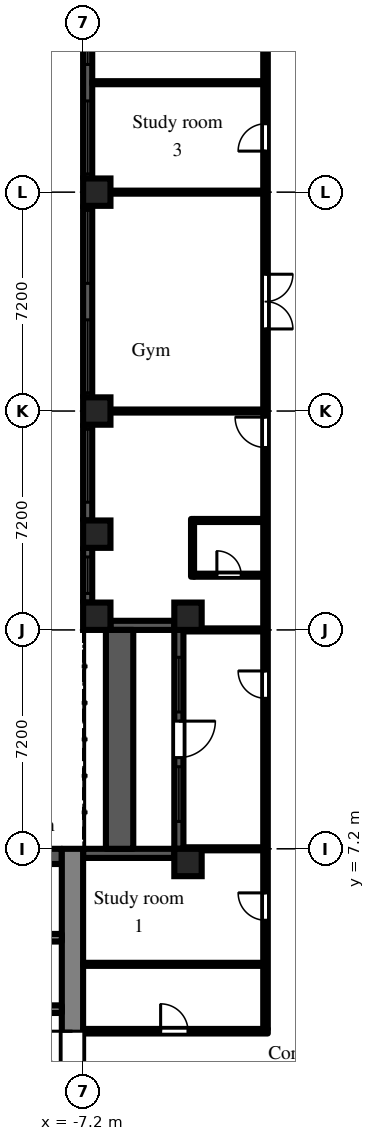
"""IFC4 building model, lengths in metres.
Left out: names, types, materials, properties, quantities, classifications, styles, units other than length and angle.
Written with IfcOpenShell. Run it as: python <this file> out.ifc"""

import sys

from ifc_helpers import new_model, si_unit, direction, frame, frame_2d, origin, origin_2d, place, context, subcontext, project, spatial, rectangle, extrude, element, fill, save


model = new_model("IFC4")
c1 = context("Model", 3, precision=1e-05, world=origin(), true_north=direction((0.0, 1.0)))
c2 = subcontext(c1, "Body", "Model", "MODEL_VIEW")
j1 = project(units=[si_unit("LENGTHUNIT", "METRE"), si_unit("PLANEANGLEUNIT", "RADIAN")], contexts=[c1])
p1 = place(None, origin())
s1 = spatial("IfcSite", under=j1, at=p1, CompositionType="ELEMENT")
p2 = place(p1, origin())
s2 = spatial("IfcBuilding", under=s1, at=p2, CompositionType="ELEMENT")
p3 = place(p2, frame((0.0, 0.0, 35.7)))
s3 = spatial("IfcBuildingStorey", under=s2, at=p3, CompositionType="ELEMENT", Elevation=35.7)
for number, where, z_axis, x_axis in (
    (1, (-6.75, 14.85, 0.0), (0.0, 0.0, 1.0), (1.0, 0.0, 0.0)),
    (2, (-6.75, 17.55, 0.0), (0.0, 0.0, 1.0), (1.0, 0.0, 0.0)),
    (3, (-6.75, 21.6, 0.0), (0.0, 0.0, 1.0), (1.0, 0.0, 0.0)),
    (4, (-6.75, 28.8, 0.0), (0.0, 0.0, 1.0), (1.0, 0.0, 0.0)),
    (5, (-3.75, 6.75, 0.0), (0.0, 0.0, 1.0), (1.0, 0.0, 0.0)),
    (6, (-3.75, 14.85, 0.0), (0.0, 0.0, 1.0), (1.0, 0.0, 0.0)),
):
    element("IfcColumn", number, at=place(p3, frame(where, z_axis=z_axis, x_axis=x_axis)), inside=s3, PredefinedType="COLUMN", context=c2, shape_type="SweptSolid", body=[
        extrude(rectangle(XDim=0.9, YDim=0.9, at=origin_2d()), origin(), (0.0, 0.0, 1.0), 3.0),
    ])
p4 = place(p3, frame((-7.05, 35.55, 0.0), z_axis=(0.0, 0.0, 1.0), x_axis=(0.0, -1.0, 0.0)))
e7 = element("IfcWall", 7, at=p4, inside=s3, PredefinedType="SOLIDWALL", context=c2, shape_type="SweptSolid", body=[
    extrude(rectangle(XDim=6.3, YDim=0.3, at=frame_2d((3.15, 0.0))), origin(), (0.0, 0.0, 1.0), 2.1),
])
p5 = place(p4, frame((0.15, 0.0, 0.2)))
e8 = element("IfcOpeningElement", 8, at=p5, cuts=e7, PredefinedType="OPENING", context=c2, shape_type="SweptSolid", body=[
    extrude(rectangle(XDim=2.4, YDim=1.85, at=frame_2d((1.2, 0.925))), frame((0.0, 0.16, 0.0), z_axis=(0.0, -1.0, 0.0), x_axis=(1.0, 0.0, 0.0)), (0.0, 0.0, 1.0), 0.32),
])
p6 = place(p4, frame((3.75, 0.0, 0.2)))
e9 = element("IfcOpeningElement", 9, at=p6, cuts=e7, PredefinedType="OPENING", context=c2, shape_type="SweptSolid", body=[
    extrude(rectangle(XDim=2.4, YDim=1.85, at=frame_2d((1.2, 0.925))), frame((0.0, 0.16, 0.0), z_axis=(0.0, -1.0, 0.0), x_axis=(1.0, 0.0, 0.0)), (0.0, 0.0, 1.0), 0.32),
])
p7 = place(p3, frame((-7.05, 28.35, 0.0), z_axis=(0.0, 0.0, 1.0), x_axis=(0.0, -1.0, 0.0)))
e10 = element("IfcWall", 10, at=p7, inside=s3, PredefinedType="SOLIDWALL", context=c2, shape_type="SweptSolid", body=[
    extrude(rectangle(XDim=6.3, YDim=0.3, at=frame_2d((3.15, 0.0))), origin(), (0.0, 0.0, 1.0), 2.1),
])
p8 = place(p7, frame((0.15, 0.0, 0.2)))
e11 = element("IfcOpeningElement", 11, at=p8, cuts=e10, PredefinedType="OPENING", context=c2, shape_type="SweptSolid", body=[
    extrude(rectangle(XDim=2.4, YDim=1.85, at=frame_2d((1.2, 0.925))), frame((0.0, 0.16, 0.0), z_axis=(0.0, -1.0, 0.0), x_axis=(1.0, 0.0, 0.0)), (0.0, 0.0, 1.0), 0.32),
])
p9 = place(p7, frame((3.75, 0.0, 0.2)))
e12 = element("IfcOpeningElement", 12, at=p9, cuts=e10, PredefinedType="OPENING", context=c2, shape_type="SweptSolid", body=[
    extrude(rectangle(XDim=2.4, YDim=1.85, at=frame_2d((1.2, 0.925))), frame((0.0, 0.16, 0.0), z_axis=(0.0, -1.0, 0.0), x_axis=(1.0, 0.0, 0.0)), (0.0, 0.0, 1.0), 0.32),
])
p10 = place(p3, frame((-7.05, 21.15, 0.0), z_axis=(0.0, 0.0, 1.0), x_axis=(0.0, -1.0, 0.0)))
e13 = element("IfcWall", 13, at=p10, inside=s3, PredefinedType="SOLIDWALL", context=c2, shape_type="SweptSolid", body=[
    extrude(rectangle(XDim=3.15, YDim=0.3, at=frame_2d((1.575, 0.0))), origin(), (0.0, 0.0, 1.0), 2.1),
])
p11 = place(p10, frame((0.15, 0.0, 0.2)))
e14 = element("IfcOpeningElement", 14, at=p11, cuts=e13, PredefinedType="OPENING", context=c2, shape_type="SweptSolid", body=[
    extrude(rectangle(XDim=2.4, YDim=1.85, at=frame_2d((1.2, 0.925))), frame((0.0, 0.16, 0.0), z_axis=(0.0, -1.0, 0.0), x_axis=(1.0, 0.0, 0.0)), (0.0, 0.0, 1.0), 0.32),
])
p12 = place(p3, frame((-7.05, 17.1, 0.0), z_axis=(0.0, 0.0, 1.0), x_axis=(0.0, -1.0, 0.0)))
e15 = element("IfcWall", 15, at=p12, inside=s3, PredefinedType="SOLIDWALL", context=c2, shape_type="SweptSolid", body=[
    extrude(rectangle(XDim=1.8, YDim=0.3, at=frame_2d((0.9, 0.0))), origin(), (0.0, 0.0, 1.0), 2.1),
])
p13 = place(p12, frame((0.3, 0.0, 0.2)))
e16 = element("IfcOpeningElement", 16, at=p13, cuts=e15, PredefinedType="OPENING", context=c2, shape_type="SweptSolid", body=[
    extrude(rectangle(XDim=1.2, YDim=1.85, at=frame_2d((0.6, 0.925))), frame((0.0, 0.16, 0.0), z_axis=(0.0, -1.0, 0.0), x_axis=(1.0, 0.0, 0.0)), (0.0, 0.0, 1.0), 0.32),
])
p14 = place(p3, frame((-6.3, 14.55, 0.0), z_axis=(0.0, 0.0, 1.0), x_axis=(1.0, 0.0, 0.0)))
e17 = element("IfcWall", 17, at=p14, inside=s3, PredefinedType="SOLIDWALL", context=c2, shape_type="SweptSolid", body=[
    extrude(rectangle(XDim=2.1, YDim=0.3, at=frame_2d((1.05, 0.0))), origin(), (0.0, 0.0, 1.0), 2.1),
])
p15 = place(p3, frame((-4.05, 14.4, 0.0), z_axis=(0.0, 0.0, 1.0), x_axis=(0.0, -1.0, 0.0)))
e18 = element("IfcWall", 18, at=p15, inside=s3, PredefinedType="SOLIDWALL", context=c2, shape_type="SweptSolid", body=[
    extrude(rectangle(XDim=7.2, YDim=0.3, at=frame_2d((3.6, 0.0))), origin(), (0.0, 0.0, 1.0), 2.1),
])
p16 = place(p15, frame((3.0, 0.0, 0.0)))
e19 = element("IfcOpeningElement", 19, at=p16, cuts=e18, PredefinedType="OPENING", context=c2, shape_type="SweptSolid", body=[
    extrude(rectangle(XDim=1.2, YDim=2.05, at=frame_2d((0.6, 1.025))), frame((0.0, 0.16, 0.0), z_axis=(0.0, -1.0, 0.0), x_axis=(1.0, 0.0, 0.0)), (0.0, 0.0, 1.0), 0.32),
])
p17 = place(p15, frame((0.9, 0.0, 0.2)))
e20 = element("IfcOpeningElement", 20, at=p17, cuts=e18, PredefinedType="OPENING", context=c2, shape_type="SweptSolid", body=[
    extrude(rectangle(XDim=1.8, YDim=1.85, at=frame_2d((0.9, 0.925))), frame((0.0, 0.16, 0.0), z_axis=(0.0, -1.0, 0.0), x_axis=(1.0, 0.0, 0.0)), (0.0, 0.0, 1.0), 0.32),
])
p18 = place(p15, frame((4.5, 0.0, 0.2)))
e21 = element("IfcOpeningElement", 21, at=p18, cuts=e18, PredefinedType="OPENING", context=c2, shape_type="SweptSolid", body=[
    extrude(rectangle(XDim=1.8, YDim=1.85, at=frame_2d((0.9, 0.925))), frame((0.0, 0.16, 0.0), z_axis=(0.0, -1.0, 0.0), x_axis=(1.0, 0.0, 0.0)), (0.0, 0.0, 1.0), 0.32),
])
p19 = place(p3, frame((-4.2, 7.05, 0.0), z_axis=(0.0, 0.0, 1.0), x_axis=(-1.0, 0.0, 0.0)))
e22 = element("IfcWall", 22, at=p19, inside=s3, PredefinedType="SOLIDWALL", context=c2, shape_type="SweptSolid", body=[
    extrude(rectangle(XDim=3.0, YDim=0.3, at=frame_2d((1.5, 0.0))), origin(), (0.0, 0.0, 1.0), 2.1),
])
p20 = place(p3, frame((-6.0, 7.2, 0.0), z_axis=(0.0, 0.0, 1.0), x_axis=(0.0, 1.0, 0.0)))
e23 = element("IfcWall", 23, at=p20, inside=s3, PredefinedType="PARAPET", context=c2, shape_type="SweptSolid", body=[
    extrude(rectangle(XDim=7.2, YDim=0.9, at=frame_2d((3.6, 0.0))), origin(), (0.0, 0.0, 1.0), 0.8),
])
p21 = place(p3, frame((-7.55, -7.2, 0.0), z_axis=(0.0, 0.0, 1.0), x_axis=(0.0, 1.0, 0.0)))
e24 = element("IfcWall", 24, at=p21, inside=s3, PredefinedType="SHEAR", context=c2, shape_type="SweptSolid", body=[
    extrude(rectangle(XDim=14.4, YDim=0.7, at=frame_2d((7.2, 0.0))), origin(), (0.0, 0.0, 1.0), 2.575),
])
p22 = place(p21, frame((6.0, 0.0, 0.0)))
e25 = element("IfcOpeningElement", 25, at=p22, cuts=e24, PredefinedType="OPENING", context=c2, shape_type="SweptSolid", body=[
    extrude(rectangle(XDim=2.4, YDim=2.2, at=frame_2d((1.2, 1.1))), frame((0.0, 0.36, 0.0), z_axis=(0.0, -1.0, 0.0), x_axis=(1.0, 0.0, 0.0)), (0.0, 0.0, 1.0), 0.72),
])
p23 = place(p3, frame((-7.9, 6.95, 0.0), z_axis=(0.0, 0.0, 1.0), x_axis=(-1.0, 0.0, 0.0)))
e26 = element("IfcWall", 26, at=p23, inside=s3, PredefinedType="SHEAR", context=c2, shape_type="SweptSolid", body=[
    extrude(rectangle(XDim=12.95, YDim=0.5, at=frame_2d((6.475, 0.0))), origin(), (0.0, 0.0, 1.0), 2.575),
])
p24 = place(p3, frame((-7.9, 1.925, 0.0), z_axis=(0.0, 0.0, 1.0), x_axis=(-1.0, 0.0, 0.0)))
e27 = element("IfcWall", 27, at=p24, inside=s3, PredefinedType="SHEAR", context=c2, shape_type="SweptSolid", body=[
    extrude(rectangle(XDim=12.95, YDim=0.25, at=frame_2d((6.475, 0.0))), origin(), (0.0, 0.0, 1.0), 2.575),
])
p25 = place(p24, frame((0.525, 0.0, 0.0)))
e28 = element("IfcOpeningElement", 28, at=p25, cuts=e27, PredefinedType="OPENING", context=c2, shape_type="SweptSolid", body=[
    extrude(rectangle(XDim=0.9, YDim=2.1, at=frame_2d((0.45, 1.05))), frame((0.0, 0.135, 0.0), z_axis=(0.0, -1.0, 0.0), x_axis=(1.0, 0.0, 0.0)), (0.0, 0.0, 1.0), 0.27),
])
p26 = place(p24, frame((2.625, 0.0, 0.0)))
e29 = element("IfcOpeningElement", 29, at=p26, cuts=e27, PredefinedType="OPENING", context=c2, shape_type="SweptSolid", body=[
    extrude(rectangle(XDim=1.1, YDim=2.1, at=frame_2d((0.55, 1.05))), frame((0.0, 0.135, 0.0), z_axis=(0.0, -1.0, 0.0), x_axis=(1.0, 0.0, 0.0)), (0.0, 0.0, 1.0), 0.27),
])
p27 = place(p24, frame((7.125, 0.0, 0.0)))
e30 = element("IfcOpeningElement", 30, at=p27, cuts=e27, PredefinedType="OPENING", context=c2, shape_type="SweptSolid", body=[
    extrude(rectangle(XDim=0.9, YDim=2.1, at=frame_2d((0.45, 1.05))), frame((0.0, 0.135, 0.0), z_axis=(0.0, -1.0, 0.0), x_axis=(1.0, 0.0, 0.0)), (0.0, 0.0, 1.0), 0.27),
])
p28 = place(p3, frame((-7.9, 4.275, 0.0), z_axis=(0.0, 0.0, 1.0), x_axis=(-1.0, 0.0, 0.0)))
e31 = element("IfcWall", 31, at=p28, inside=s3, PredefinedType="SHEAR", context=c2, shape_type="SweptSolid", body=[
    extrude(rectangle(XDim=1.95, YDim=0.25, at=frame_2d((0.975, 0.0))), origin(), (0.0, 0.0, 1.0), 2.575),
])
p29 = place(p3, frame((-7.2, 1.2, 0.0), z_axis=(0.0, 0.0, 1.0), x_axis=(1.0, 0.0, 0.0)))
e32 = element("IfcWall", 32, at=p29, inside=s3, PredefinedType="PARTITIONING", context=c2, shape_type="SweptSolid", body=[
    extrude(rectangle(XDim=6.075, YDim=0.15, at=frame_2d((3.038, 0.0))), origin(), (0.0, 0.0, 1.0), 2.575),
])
p30 = place(p29, frame((2.55, 0.0, 0.0)))
e33 = element("IfcOpeningElement", 33, at=p30, cuts=e32, PredefinedType="OPENING", context=c2, shape_type="SweptSolid", body=[
    extrude(rectangle(XDim=0.9, YDim=2.1, at=frame_2d((0.45, 1.05))), frame((0.0, 0.085, 0.0), z_axis=(0.0, -1.0, 0.0), x_axis=(1.0, 0.0, 0.0)), (0.0, 0.0, 1.0), 0.17),
])
p31 = place(p3, frame((-7.2, 3.4, 0.0), z_axis=(0.0, 0.0, 1.0), x_axis=(1.0, 0.0, 0.0)))
e34 = element("IfcWall", 34, at=p31, inside=s3, PredefinedType="PARTITIONING", context=c2, shape_type="SweptSolid", body=[
    extrude(rectangle(XDim=5.925, YDim=0.1, at=frame_2d((2.962, 0.0))), origin(), (0.0, 0.0, 1.0), 2.575),
])
for number, where, z_axis, x_axis in (
    (35, (-6.9, 21.6, 0.0), (0.0, 0.0, 1.0), (1.0, 0.0, 0.0)),
    (36, (-6.9, 28.8, 0.0), (0.0, 0.0, 1.0), (1.0, 0.0, 0.0)),
    (37, (-6.9, 32.4, 0.0), (0.0, 0.0, 1.0), (1.0, 0.0, 0.0)),
):
    element("IfcWall", number, at=place(p3, frame(where, z_axis=z_axis, x_axis=x_axis)), inside=s3, PredefinedType="PARTITIONING", context=c2, shape_type="SweptSolid", body=[
        extrude(rectangle(XDim=5.625, YDim=0.1, at=frame_2d((2.812, 0.0))), origin(), (0.0, 0.0, 1.0), 2.575),
    ])
for number, where, z_axis, x_axis in (
    (38, (-3.9, 7.2, 0.0), (0.0, 0.0, 1.0), (1.0, 0.0, 0.0)),
    (39, (-3.9, 14.4, 0.0), (0.0, 0.0, 1.0), (1.0, 0.0, 0.0)),
):
    element("IfcWall", number, at=place(p3, frame(where, z_axis=z_axis, x_axis=x_axis)), inside=s3, PredefinedType="PARTITIONING", context=c2, shape_type="SweptSolid", body=[
        extrude(rectangle(XDim=2.625, YDim=0.1, at=frame_2d((1.312, 0.0))), origin(), (0.0, 0.0, 1.0), 2.575),
    ])
p32 = place(p3, frame((-3.6, 16.15, 0.0), z_axis=(0.0, 0.0, 1.0), x_axis=(0.0, 1.0, 0.0)))
e40 = element("IfcWall", 40, at=p32, inside=s3, PredefinedType="PARTITIONING", context=c2, shape_type="SweptSolid", body=[
    extrude(rectangle(XDim=1.9, YDim=0.1, at=frame_2d((0.95, 0.0))), origin(), (0.0, 0.0, 1.0), 2.575),
])
p33 = place(p3, frame((-3.55, 16.2, 0.0), z_axis=(0.0, 0.0, 1.0), x_axis=(1.0, 0.0, 0.0)))
e41 = element("IfcWall", 41, at=p33, inside=s3, PredefinedType="PARTITIONING", context=c2, shape_type="SweptSolid", body=[
    extrude(rectangle(XDim=2.275, YDim=0.1, at=frame_2d((1.138, 0.0))), origin(), (0.0, 0.0, 1.0), 2.575),
])
p34 = place(p33, frame((0.75, 0.0, 0.0)))
e42 = element("IfcOpeningElement", 42, at=p34, cuts=e41, PredefinedType="OPENING", context=c2, shape_type="SweptSolid", body=[
    extrude(rectangle(XDim=0.8, YDim=2.1, at=frame_2d((0.4, 1.05))), frame((0.0, 0.06, 0.0), z_axis=(0.0, -1.0, 0.0), x_axis=(1.0, 0.0, 0.0)), (0.0, 0.0, 1.0), 0.12),
])
p35 = place(p3, frame((-3.55, 18.0, 0.0), z_axis=(0.0, 0.0, 1.0), x_axis=(1.0, 0.0, 0.0)))
e43 = element("IfcWall", 43, at=p35, inside=s3, PredefinedType="PARTITIONING", context=c2, shape_type="SweptSolid", body=[
    extrude(rectangle(XDim=2.275, YDim=0.1, at=frame_2d((1.138, 0.0))), origin(), (0.0, 0.0, 1.0), 2.575),
])
p36 = place(p3, frame((-1.2, 1.275, 0.0), z_axis=(0.0, 0.0, 1.0), x_axis=(0.0, 1.0, 0.0)))
e44 = element("IfcWall", 44, at=p36, inside=s3, PredefinedType="PARTITIONING", context=c2, shape_type="SweptSolid", body=[
    extrude(rectangle(XDim=35.225, YDim=0.15, at=frame_2d((17.613, 0.0))), origin(), (0.0, 0.0, 1.0), 2.575),
])
p37 = place(p36, frame((3.575, 0.0, 0.0)))
e45 = element("IfcOpeningElement", 45, at=p37, cuts=e44, PredefinedType="OPENING", context=c2, shape_type="SweptSolid", body=[
    extrude(rectangle(XDim=0.9, YDim=2.1, at=frame_2d((0.45, 1.05))), frame((0.0, 0.085, 0.0), z_axis=(0.0, -1.0, 0.0), x_axis=(1.0, 0.0, 0.0)), (0.0, 0.0, 1.0), 0.17),
])
p38 = place(p36, frame((10.875, 0.0, 0.0)))
e46 = element("IfcOpeningElement", 46, at=p38, cuts=e44, PredefinedType="OPENING", context=c2, shape_type="SweptSolid", body=[
    extrude(rectangle(XDim=0.9, YDim=2.1, at=frame_2d((0.45, 1.05))), frame((0.0, 0.085, 0.0), z_axis=(0.0, -1.0, 0.0), x_axis=(1.0, 0.0, 0.0)), (0.0, 0.0, 1.0), 0.17),
])
p39 = place(p36, frame((19.125, 0.0, 0.0)))
e47 = element("IfcOpeningElement", 47, at=p39, cuts=e44, PredefinedType="OPENING", context=c2, shape_type="SweptSolid", body=[
    extrude(rectangle(XDim=1.0, YDim=2.1, at=frame_2d((0.5, 1.05))), frame((0.0, 0.085, 0.0), z_axis=(0.0, -1.0, 0.0), x_axis=(1.0, 0.0, 0.0)), (0.0, 0.0, 1.0), 0.17),
])
p40 = place(p36, frame((23.025, 0.0, 0.0)))
e48 = element("IfcOpeningElement", 48, at=p40, cuts=e44, PredefinedType="OPENING", context=c2, shape_type="SweptSolid", body=[
    extrude(rectangle(XDim=1.8, YDim=2.1, at=frame_2d((0.9, 1.05))), frame((0.0, 0.085, 0.0), z_axis=(0.0, -1.0, 0.0), x_axis=(1.0, 0.0, 0.0)), (0.0, 0.0, 1.0), 0.17),
])
p41 = place(p36, frame((28.875, 0.0, 0.0)))
e49 = element("IfcOpeningElement", 49, at=p41, cuts=e44, PredefinedType="OPENING", context=c2, shape_type="SweptSolid", body=[
    extrude(rectangle(XDim=0.9, YDim=2.1, at=frame_2d((0.45, 1.05))), frame((0.0, 0.085, 0.0), z_axis=(0.0, -1.0, 0.0), x_axis=(1.0, 0.0, 0.0)), (0.0, 0.0, 1.0), 0.17),
])
p42 = place(p36, frame((32.275, 0.0, 0.0)))
e50 = element("IfcOpeningElement", 50, at=p42, cuts=e44, PredefinedType="OPENING", context=c2, shape_type="SweptSolid", body=[
    extrude(rectangle(XDim=1.8, YDim=2.1, at=frame_2d((0.9, 1.05))), frame((0.0, 0.085, 0.0), z_axis=(0.0, -1.0, 0.0), x_axis=(1.0, 0.0, 0.0)), (0.0, 0.0, 1.0), 0.17),
])
p43 = place(p5, origin())
e51 = element("IfcWindow", 51, at=p43, inside=s3, PartitioningType="SINGLE_PANEL", PredefinedType="WINDOW", context=c2, shape_type="SweptSolid", body=[
    extrude(rectangle(XDim=2.4, YDim=1.85, at=frame_2d((1.2, 0.925))), frame((0.0, 0.03, 0.0), z_axis=(0.0, -1.0, 0.0), x_axis=(1.0, 0.0, 0.0)), (0.0, 0.0, 1.0), 0.06),
])
fill(e8, e51)
p44 = place(p6, origin())
e52 = element("IfcWindow", 52, at=p44, inside=s3, PartitioningType="SINGLE_PANEL", PredefinedType="WINDOW", context=c2, shape_type="SweptSolid", body=[
    extrude(rectangle(XDim=2.4, YDim=1.85, at=frame_2d((1.2, 0.925))), frame((0.0, 0.03, 0.0), z_axis=(0.0, -1.0, 0.0), x_axis=(1.0, 0.0, 0.0)), (0.0, 0.0, 1.0), 0.06),
])
fill(e9, e52)
p45 = place(p8, origin())
e53 = element("IfcWindow", 53, at=p45, inside=s3, PartitioningType="SINGLE_PANEL", PredefinedType="WINDOW", context=c2, shape_type="SweptSolid", body=[
    extrude(rectangle(XDim=2.4, YDim=1.85, at=frame_2d((1.2, 0.925))), frame((0.0, 0.03, 0.0), z_axis=(0.0, -1.0, 0.0), x_axis=(1.0, 0.0, 0.0)), (0.0, 0.0, 1.0), 0.06),
])
fill(e11, e53)
p46 = place(p9, origin())
e54 = element("IfcWindow", 54, at=p46, inside=s3, PartitioningType="SINGLE_PANEL", PredefinedType="WINDOW", context=c2, shape_type="SweptSolid", body=[
    extrude(rectangle(XDim=2.4, YDim=1.85, at=frame_2d((1.2, 0.925))), frame((0.0, 0.03, 0.0), z_axis=(0.0, -1.0, 0.0), x_axis=(1.0, 0.0, 0.0)), (0.0, 0.0, 1.0), 0.06),
])
fill(e12, e54)
p47 = place(p11, origin())
e55 = element("IfcWindow", 55, at=p47, inside=s3, PartitioningType="SINGLE_PANEL", PredefinedType="WINDOW", context=c2, shape_type="SweptSolid", body=[
    extrude(rectangle(XDim=2.4, YDim=1.85, at=frame_2d((1.2, 0.925))), frame((0.0, 0.03, 0.0), z_axis=(0.0, -1.0, 0.0), x_axis=(1.0, 0.0, 0.0)), (0.0, 0.0, 1.0), 0.06),
])
fill(e14, e55)
p48 = place(p13, origin())
e56 = element("IfcWindow", 56, at=p48, inside=s3, PartitioningType="SINGLE_PANEL", PredefinedType="WINDOW", context=c2, shape_type="SweptSolid", body=[
    extrude(rectangle(XDim=1.2, YDim=1.85, at=frame_2d((0.6, 0.925))), frame((0.0, 0.03, 0.0), z_axis=(0.0, -1.0, 0.0), x_axis=(1.0, 0.0, 0.0)), (0.0, 0.0, 1.0), 0.06),
])
fill(e16, e56)
p49 = place(p16, origin())
e57 = element("IfcDoor", 57, at=p49, inside=s3, OperationType="SINGLE_SWING_LEFT", PredefinedType="DOOR", context=c2, shape_type="SweptSolid", body=[
    extrude(rectangle(XDim=1.2, YDim=2.05, at=frame_2d((0.6, 1.025))), frame((0.0, 0.025, 0.0), z_axis=(0.0, -1.0, 0.0), x_axis=(1.0, 0.0, 0.0)), (0.0, 0.0, 1.0), 0.05),
])
fill(e19, e57)
p50 = place(p17, origin())
e58 = element("IfcWindow", 58, at=p50, inside=s3, PartitioningType="SINGLE_PANEL", PredefinedType="WINDOW", context=c2, shape_type="SweptSolid", body=[
    extrude(rectangle(XDim=1.8, YDim=1.85, at=frame_2d((0.9, 0.925))), frame((0.0, 0.03, 0.0), z_axis=(0.0, -1.0, 0.0), x_axis=(1.0, 0.0, 0.0)), (0.0, 0.0, 1.0), 0.06),
])
fill(e20, e58)
p51 = place(p18, origin())
e59 = element("IfcWindow", 59, at=p51, inside=s3, PartitioningType="SINGLE_PANEL", PredefinedType="WINDOW", context=c2, shape_type="SweptSolid", body=[
    extrude(rectangle(XDim=1.8, YDim=1.85, at=frame_2d((0.9, 0.925))), frame((0.0, 0.03, 0.0), z_axis=(0.0, -1.0, 0.0), x_axis=(1.0, 0.0, 0.0)), (0.0, 0.0, 1.0), 0.06),
])
fill(e21, e59)
p52 = place(p22, origin())
e60 = element("IfcDoor", 60, at=p52, inside=s3, OperationType="DOUBLE_DOOR_DOUBLE_SWING", PredefinedType="DOOR", context=c2, shape_type="SweptSolid", body=[
    extrude(rectangle(XDim=2.4, YDim=2.2, at=frame_2d((1.2, 1.1))), frame((0.0, 0.025, 0.0), z_axis=(0.0, -1.0, 0.0), x_axis=(1.0, 0.0, 0.0)), (0.0, 0.0, 1.0), 0.05),
])
fill(e25, e60)
p53 = place(p30, origin())
e61 = element("IfcDoor", 61, at=p53, inside=s3, OperationType="SINGLE_SWING_LEFT", PredefinedType="DOOR", context=c2, shape_type="SweptSolid", body=[
    extrude(rectangle(XDim=0.9, YDim=2.1, at=frame_2d((0.45, 1.05))), frame((0.0, 0.025, 0.0), z_axis=(0.0, -1.0, 0.0), x_axis=(1.0, 0.0, 0.0)), (0.0, 0.0, 1.0), 0.05),
])
fill(e33, e61)
p54 = place(p37, origin())
e62 = element("IfcDoor", 62, at=p54, inside=s3, OperationType="SINGLE_SWING_RIGHT", PredefinedType="DOOR", context=c2, shape_type="SweptSolid", body=[
    extrude(rectangle(XDim=0.9, YDim=2.1, at=frame_2d((0.45, 1.05))), frame((0.0, 0.025, 0.0), z_axis=(0.0, -1.0, 0.0), x_axis=(1.0, 0.0, 0.0)), (0.0, 0.0, 1.0), 0.05),
])
fill(e45, e62)
p55 = place(p38, origin())
e63 = element("IfcDoor", 63, at=p55, inside=s3, OperationType="SINGLE_SWING_RIGHT", PredefinedType="DOOR", context=c2, shape_type="SweptSolid", body=[
    extrude(rectangle(XDim=0.9, YDim=2.1, at=frame_2d((0.45, 1.05))), frame((0.0, 0.025, 0.0), z_axis=(0.0, -1.0, 0.0), x_axis=(1.0, 0.0, 0.0)), (0.0, 0.0, 1.0), 0.05),
])
fill(e46, e63)
p56 = place(p34, origin())
e64 = element("IfcDoor", 64, at=p56, inside=s3, OperationType="SINGLE_SWING_LEFT", PredefinedType="DOOR", context=c2, shape_type="SweptSolid", body=[
    extrude(rectangle(XDim=0.8, YDim=2.1, at=frame_2d((0.4, 1.05))), frame((0.0, 0.025, 0.0), z_axis=(0.0, -1.0, 0.0), x_axis=(1.0, 0.0, 0.0)), (0.0, 0.0, 1.0), 0.05),
])
fill(e42, e64)
p57 = place(p39, origin())
e65 = element("IfcDoor", 65, at=p57, inside=s3, OperationType="SINGLE_SWING_RIGHT", PredefinedType="DOOR", context=c2, shape_type="SweptSolid", body=[
    extrude(rectangle(XDim=1.0, YDim=2.1, at=frame_2d((0.5, 1.05))), frame((0.0, 0.025, 0.0), z_axis=(0.0, -1.0, 0.0), x_axis=(1.0, 0.0, 0.0)), (0.0, 0.0, 1.0), 0.05),
])
fill(e47, e65)
p58 = place(p40, frame((1.8, 0.0, 0.0), z_axis=(0.0, 0.0, 1.0), x_axis=(-1.0, 0.0, 0.0)))
e66 = element("IfcDoor", 66, at=p58, inside=s3, OperationType="DOUBLE_DOOR_DOUBLE_SWING", PredefinedType="DOOR", context=c2, shape_type="SweptSolid", body=[
    extrude(rectangle(XDim=1.8, YDim=2.1, at=frame_2d((0.9, 1.05))), frame((0.0, 0.025, 0.0), z_axis=(0.0, -1.0, 0.0), x_axis=(1.0, 0.0, 0.0)), (0.0, 0.0, 1.0), 0.05),
])
fill(e48, e66)
p59 = place(p41, origin())
e67 = element("IfcDoor", 67, at=p59, inside=s3, OperationType="SINGLE_SWING_LEFT", PredefinedType="DOOR", context=c2, shape_type="SweptSolid", body=[
    extrude(rectangle(XDim=0.9, YDim=2.1, at=frame_2d((0.45, 1.05))), frame((0.0, 0.025, 0.0), z_axis=(0.0, -1.0, 0.0), x_axis=(1.0, 0.0, 0.0)), (0.0, 0.0, 1.0), 0.05),
])
fill(e49, e67)
save(model, sys.argv[1])
